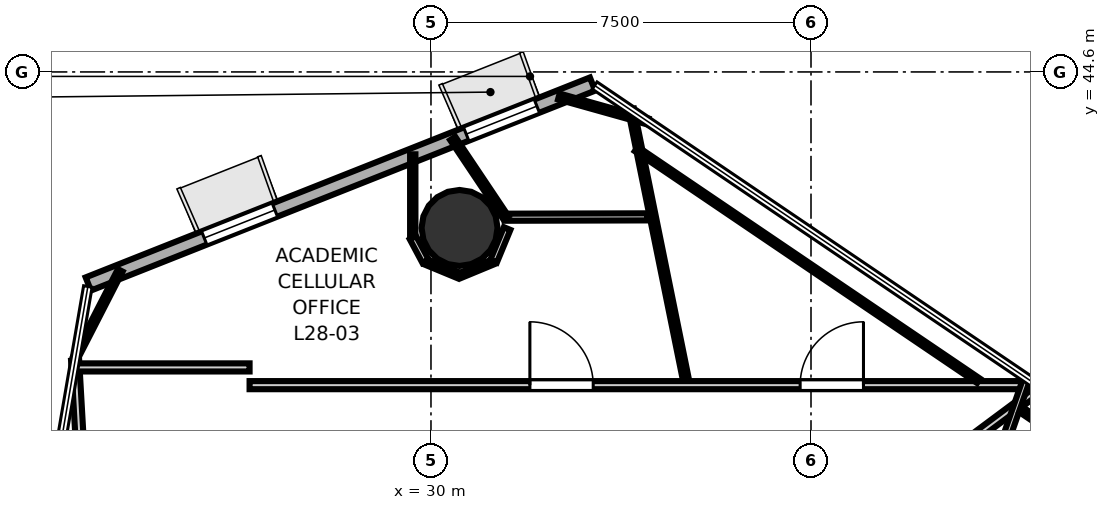
"""IFC4 building model, lengths in metres.
Left out: names, types, materials, properties, quantities, classifications, styles, units other than length and angle.
Written with IfcOpenShell. Run it as: python <this file> out.ifc"""

import sys

from ifc_helpers import new_model, si_unit, direction, frame, frame_2d, origin, origin_2d, place, context, subcontext, project, spatial, rectangle, hollow_circle, extrude, element, fill, save


model = new_model("IFC4")
c1 = context("Model", 3, precision=1e-05, world=origin(), true_north=direction((0.0, 1.0)))
c2 = subcontext(c1, "Body", "Model", "MODEL_VIEW")
j1 = project(units=[si_unit("LENGTHUNIT", "METRE"), si_unit("PLANEANGLEUNIT", "RADIAN")], contexts=[c1])
p1 = place(None, origin())
s1 = spatial("IfcSite", under=j1, at=p1, CompositionType="ELEMENT")
p2 = place(p1, origin())
s2 = spatial("IfcBuilding", under=s1, at=p2, CompositionType="ELEMENT")
p3 = place(p2, frame((0.0, 0.0, 112.6)))
s3 = spatial("IfcBuildingStorey", under=s2, at=p3, CompositionType="ELEMENT", Elevation=112.6)
p4 = place(p3, frame((30.564, 41.521, 0.0), z_axis=(0.0, 0.0, 1.0), x_axis=(1.0, 0.0, 0.0)))
e1 = element("IfcColumn", 1, at=p4, inside=s3, PredefinedType="COLUMN", context=c2, shape_type="SweptSolid", body=[
    extrude(hollow_circle(Radius=0.75, WallThickness=0.036, at=origin_2d()), origin(), (0.0, 0.0, 1.0), 3.7),
])
p5 = place(p3, frame((33.188, 44.361, 0.0), z_axis=(0.0, 0.0, 1.0), x_axis=(-0.929607947385, -0.368549947983, 0.0)))
e2 = element("IfcWall", 2, at=p5, inside=s3, PredefinedType="SOLIDWALL", context=c2, shape_type="SweptSolid", body=[
    extrude(rectangle(XDim=10.705, YDim=0.28, at=frame_2d((5.353, 0.0))), origin(), (0.0, 0.0, 1.0), 3.52),
])
p6 = place(p5, frame((1.181, 0.0, 0.85)))
e3 = element("IfcOpeningElement", 3, at=p6, cuts=e2, PredefinedType="OPENING", context=c2, shape_type="SweptSolid", body=[
    extrude(rectangle(XDim=1.5, YDim=2.1, at=frame_2d((0.75, 1.05))), frame((0.0, 0.15, 0.0), z_axis=(0.0, -1.0, 0.0), x_axis=(1.0, 0.0, 0.0)), (0.0, 0.0, 1.0), 0.3),
])
p7 = place(p5, frame((6.743, 0.0, 0.85)))
e4 = element("IfcOpeningElement", 4, at=p7, cuts=e2, PredefinedType="OPENING", context=c2, shape_type="SweptSolid", body=[
    extrude(rectangle(XDim=1.5, YDim=2.1, at=frame_2d((0.75, 1.05))), frame((0.0, 0.15, 0.0), z_axis=(0.0, -1.0, 0.0), x_axis=(1.0, 0.0, 0.0)), (0.0, 0.0, 1.0), 0.3),
])
p8 = place(p3, frame((23.581, 28.307, 0.0), z_axis=(0.0, 0.0, 1.0), x_axis=(-0.056927299401, 0.998378326379, 0.0)))
e5 = element("IfcWall", 5, at=p8, inside=s3, PredefinedType="PARTITIONING", context=c2, shape_type="SweptSolid", body=[
    extrude(rectangle(XDim=10.615, YDim=0.16, at=frame_2d((5.307, 0.0))), origin(), (0.0, 0.0, 1.0), 2.84),
])
p9 = place(p8, frame((3.594, 0.0, 0.0)))
e6 = element("IfcOpeningElement", 6, at=p9, cuts=e5, PredefinedType="OPENING", context=c2, shape_type="SweptSolid", body=[
    extrude(rectangle(XDim=1.25, YDim=2.2, at=frame_2d((0.625, 1.1))), frame((0.0, 0.09, 0.0), z_axis=(0.0, -1.0, 0.0), x_axis=(1.0, 0.0, 0.0)), (0.0, 0.0, 1.0), 0.18),
])
p10 = place(p3, frame((22.934, 38.769, 0.0), z_axis=(0.0, 0.0, 1.0), x_axis=(1.0, 0.0, 0.0)))
e7 = element("IfcWall", 7, at=p10, inside=s3, PredefinedType="PARTITIONING", context=c2, shape_type="SweptSolid", body=[
    extrude(rectangle(XDim=3.486, YDim=0.16, at=frame_2d((1.743, 0.0))), origin(), (0.0, 0.0, 1.0), 2.84),
])
p11 = place(p3, frame((26.42, 38.419, 0.0), z_axis=(0.0, 0.0, 1.0), x_axis=(1.0, 0.0, 0.0)))
e8 = element("IfcWall", 8, at=p11, inside=s3, PredefinedType="PARTITIONING", context=c2, shape_type="SweptSolid", body=[
    extrude(rectangle(XDim=15.56, YDim=0.16, at=frame_2d((7.78, 0.0))), origin(), (0.0, 0.0, 1.0), 2.84),
])
p12 = place(p11, frame((10.865, 0.0, 0.0)))
e9 = element("IfcOpeningElement", 9, at=p12, cuts=e8, PredefinedType="OPENING", context=c2, shape_type="SweptSolid", body=[
    extrude(rectangle(XDim=1.25, YDim=2.2, at=frame_2d((0.625, 1.1))), frame((0.0, 0.09, 0.0), z_axis=(0.0, -1.0, 0.0), x_axis=(1.0, 0.0, 0.0)), (0.0, 0.0, 1.0), 0.18),
])
p13 = place(p11, frame((5.532, 0.0, 0.0)))
e10 = element("IfcOpeningElement", 10, at=p13, cuts=e8, PredefinedType="OPENING", context=c2, shape_type="SweptSolid", body=[
    extrude(rectangle(XDim=1.25, YDim=2.2, at=frame_2d((0.625, 1.1))), frame((0.0, 0.09, 0.0), z_axis=(0.0, -1.0, 0.0), x_axis=(1.0, 0.0, 0.0)), (0.0, 0.0, 1.0), 0.18),
])
p14 = place(p3, frame((42.053, 38.379, 0.0), z_axis=(0.0, 0.0, 1.0), x_axis=(-0.802246834953, -0.596992475504, 0.0)))
e11 = element("IfcWall", 11, at=p14, inside=s3, PredefinedType="PARTITIONING", context=c2, shape_type="SweptSolid", body=[
    extrude(rectangle(XDim=2.796, YDim=0.16, at=frame_2d((1.398, 0.0))), origin(), (0.0, 0.0, 1.0), 2.84),
])
p15 = place(p3, frame((41.122, 36.72, 0.0), z_axis=(0.0, 0.0, 1.0), x_axis=(0.329225111587, 0.944251463277, 0.0)))
e12 = element("IfcWall", 12, at=p15, inside=s3, PredefinedType="PARTITIONING", context=c2, shape_type="SweptSolid", body=[
    extrude(rectangle(XDim=1.962, YDim=0.14, at=frame_2d((0.981, 0.0))), origin(), (0.0, 0.0, 1.0), 2.84),
])
p16 = place(p3, frame((41.65, 37.933, 0.0), z_axis=(0.0, 0.0, 1.0), x_axis=(0.827941747022, -0.560814107827, 0.0)))
e13 = element("IfcWall", 13, at=p16, inside=s3, PredefinedType="PARTITIONING", context=c2, shape_type="SweptSolid", body=[
    extrude(rectangle(XDim=11.895, YDim=0.12, at=frame_2d((5.948, 0.0))), origin(), (0.0, 0.0, 1.0), 2.095),
])
p17 = place(p3, frame((35.029, 38.536, 0.0), z_axis=(0.0, 0.0, 1.0), x_axis=(-0.198965568746, 0.980006480822, 0.0)))
e14 = element("IfcWall", 14, at=p17, inside=s3, PredefinedType="PARTITIONING", context=c2, shape_type="SweptSolid", body=[
    extrude(rectangle(XDim=5.436, YDim=0.12, at=frame_2d((2.718, 0.0))), origin(), (0.0, 0.0, 1.0), 2.84),
])
p18 = place(p3, frame((34.052, 43.08, 0.0), z_axis=(0.0, 0.0, 1.0), x_axis=(0.827934826591, -0.560824324471, 0.0)))
e15 = element("IfcWall", 15, at=p18, inside=s3, PredefinedType="PARTITIONING", context=c2, shape_type="SweptSolid", body=[
    extrude(rectangle(XDim=8.158, YDim=0.105, at=frame_2d((4.079, 0.0))), origin(), (0.0, 0.0, 1.0), 2.84),
])
p19 = place(p3, frame((22.988, 38.968, 0.0), z_axis=(0.0, 0.0, 1.0), x_axis=(0.456105833623, 0.889925541006, 0.0)))
e16 = element("IfcWall", 16, at=p19, inside=s3, PredefinedType="PARTITIONING", context=c2, shape_type="SweptSolid", body=[
    extrude(rectangle(XDim=1.928, YDim=0.105, at=frame_2d((0.964, 0.0))), origin(), (0.0, 0.0, 1.0), 2.84),
])
p20 = place(p3, frame((32.524, 44.115, 0.0), z_axis=(0.0, 0.0, 1.0), x_axis=(0.962878976212, -0.269933468042, 0.0)))
e17 = element("IfcWall", 17, at=p20, inside=s3, PredefinedType="PARTITIONING", context=c2, shape_type="SweptSolid", body=[
    extrude(rectangle(XDim=1.82, YDim=0.12, at=frame_2d((0.91, 0.0))), origin(), (0.0, 0.0, 1.0), 2.84),
])
p21 = place(p3, frame((34.267, 41.74, 0.0), z_axis=(0.0, 0.0, 1.0), x_axis=(-0.999996830361, -0.002517790248, 0.0)))
e18 = element("IfcWall", 18, at=p21, inside=s3, PredefinedType="PARTITIONING", context=c2, shape_type="SweptSolid", body=[
    extrude(rectangle(XDim=2.812, YDim=0.14, at=frame_2d((1.406, 0.0))), origin(), (0.0, 0.0, 1.0), 2.84),
])
p22 = place(p3, frame((31.481, 41.719, 0.0), z_axis=(0.0, 0.0, 1.0), x_axis=(-0.556846029643, 0.830615735025, 0.0)))
e19 = element("IfcWall", 19, at=p22, inside=s3, PredefinedType="PARTITIONING", context=c2, shape_type="SweptSolid", body=[
    extrude(rectangle(XDim=1.889, YDim=0.12, at=frame_2d((0.944, 0.0))), origin(), (0.0, 0.0, 1.0), 2.84),
])
p23 = place(p3, frame((29.64, 42.974, 0.0), z_axis=(0.0, 0.0, 1.0), x_axis=(0.0, -1.0, 0.0)))
e20 = element("IfcWall", 20, at=p23, inside=s3, PredefinedType="PARTITIONING", context=c2, shape_type="SweptSolid", body=[
    extrude(rectangle(XDim=1.631, YDim=0.105, at=frame_2d((0.815, 0.0))), origin(), (0.0, 0.0, 1.0), 2.84),
])
p24 = place(p3, frame((29.644, 41.329, 0.0), z_axis=(0.0, 0.0, 1.0), x_axis=(0.471618839574, -0.881802511994, 0.0)))
e21 = element("IfcWall", 21, at=p24, inside=s3, PredefinedType="PARTITIONING", context=c2, shape_type="SweptSolid", body=[
    extrude(rectangle(XDim=0.529, YDim=0.14, at=frame_2d((0.264, 0.0))), origin(), (0.0, 0.0, 1.0), 2.84),
])
p25 = place(p3, frame((29.909, 40.849, 0.0), z_axis=(0.0, 0.0, 1.0), x_axis=(0.923935648299, -0.382547928764, 0.0)))
e22 = element("IfcWall", 22, at=p25, inside=s3, PredefinedType="PARTITIONING", context=c2, shape_type="SweptSolid", body=[
    extrude(rectangle(XDim=0.696, YDim=0.12, at=frame_2d((0.348, 0.0))), origin(), (0.0, 0.0, 1.0), 2.84),
])
p26 = place(p3, frame((30.576, 40.583, 0.0), z_axis=(0.0, 0.0, 1.0), x_axis=(0.923935648299, 0.382547928764, 0.0)))
e23 = element("IfcWall", 23, at=p26, inside=s3, PredefinedType="PARTITIONING", context=c2, shape_type="SweptSolid", body=[
    extrude(rectangle(XDim=0.696, YDim=0.105, at=frame_2d((0.348, 0.0))), origin(), (0.0, 0.0, 1.0), 2.84),
])
p27 = place(p3, frame((31.236, 40.866, 0.0), z_axis=(0.0, 0.0, 1.0), x_axis=(0.381929177829, 0.92419159438, 0.0)))
e24 = element("IfcWall", 24, at=p27, inside=s3, PredefinedType="PARTITIONING", context=c2, shape_type="SweptSolid", body=[
    extrude(rectangle(XDim=0.698, YDim=0.14, at=frame_2d((0.349, 0.0))), origin(), (0.0, 0.0, 1.0), 2.84),
])
p28 = place(p12, origin())
e25 = element("IfcDoor", 25, at=p28, inside=s3, OperationType="SINGLE_SWING_RIGHT", PredefinedType="DOOR", context=c2, shape_type="SweptSolid", body=[
    extrude(rectangle(XDim=1.25, YDim=2.2, at=frame_2d((0.625, 1.1))), frame((0.0, 0.025, 0.0), z_axis=(0.0, -1.0, 0.0), x_axis=(1.0, 0.0, 0.0)), (0.0, 0.0, 1.0), 0.05),
])
fill(e9, e25)
p29 = place(p13, origin())
e26 = element("IfcDoor", 26, at=p29, inside=s3, OperationType="SINGLE_SWING_LEFT", PredefinedType="DOOR", context=c2, shape_type="SweptSolid", body=[
    extrude(rectangle(XDim=1.25, YDim=2.2, at=frame_2d((0.625, 1.1))), frame((0.0, 0.025, 0.0), z_axis=(0.0, -1.0, 0.0), x_axis=(1.0, 0.0, 0.0)), (0.0, 0.0, 1.0), 0.05),
])
fill(e10, e26)
p30 = place(p6, origin())
e27 = element("IfcWindow", 27, at=p30, inside=s3, PartitioningType="SINGLE_PANEL", PredefinedType="WINDOW", context=c2, shape_type="SweptSolid", body=[
    extrude(rectangle(XDim=1.5, YDim=2.1, at=frame_2d((0.75, 1.05))), frame((0.0, 0.03, 0.0), z_axis=(0.0, -1.0, 0.0), x_axis=(1.0, 0.0, 0.0)), (0.0, 0.0, 1.0), 0.06),
])
fill(e3, e27)
p31 = place(p7, origin())
e28 = element("IfcWindow", 28, at=p31, inside=s3, PartitioningType="SINGLE_PANEL", PredefinedType="WINDOW", context=c2, shape_type="SweptSolid", body=[
    extrude(rectangle(XDim=1.5, YDim=2.1, at=frame_2d((0.75, 1.05))), frame((0.0, 0.03, 0.0), z_axis=(0.0, -1.0, 0.0), x_axis=(1.0, 0.0, 0.0)), (0.0, 0.0, 1.0), 0.06),
])
fill(e4, e28)
save(model, sys.argv[1])
